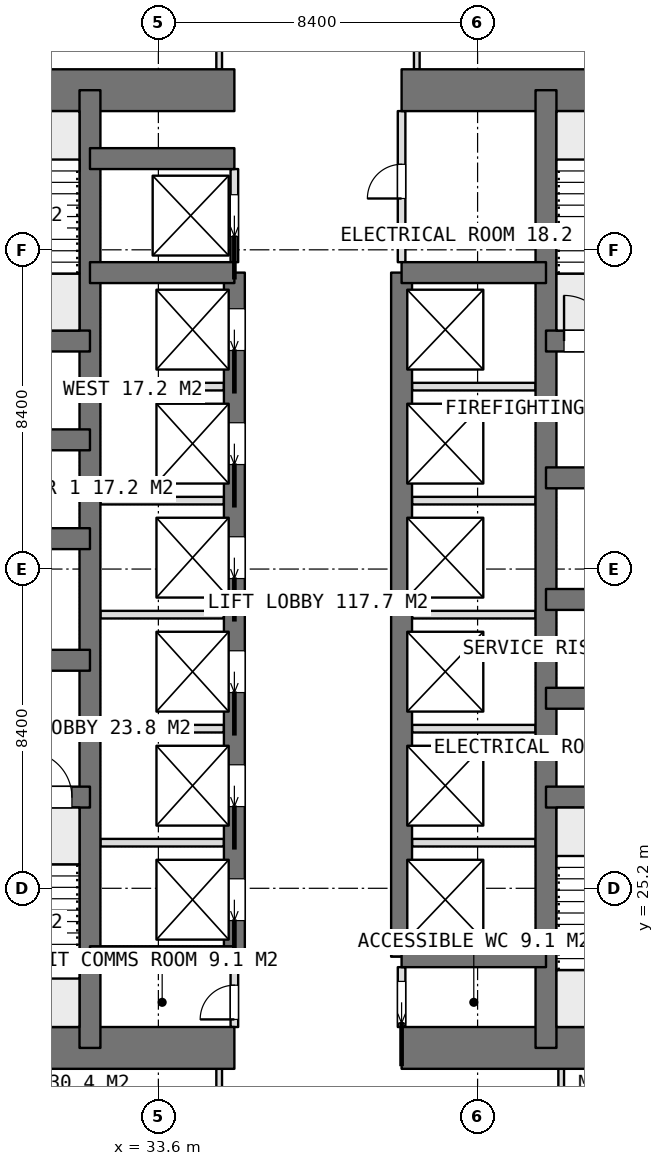
"""IFC4 building model, lengths in metres.
Left out: names, types, materials, properties, quantities, classifications, styles, units other than length and angle.
Written with IfcOpenShell. Run it as: python <this file> out.ifc"""

import sys

from ifc_helpers import new_model, si_unit, direction, frame, frame_2d, origin, place, context, subcontext, project, spatial, rectangle, extrude, element, fill, save


model = new_model("IFC4")
c1 = context("Model", 3, precision=1e-05, world=origin(), true_north=direction((0.0, 1.0)))
c2 = subcontext(c1, "Body", "Model", "MODEL_VIEW")
j1 = project(units=[si_unit("LENGTHUNIT", "METRE"), si_unit("PLANEANGLEUNIT", "RADIAN")], contexts=[c1])
p1 = place(None, origin())
s1 = spatial("IfcSite", under=j1, at=p1, CompositionType="ELEMENT")
p2 = place(p1, origin())
s2 = spatial("IfcBuilding", under=s1, at=p2, CompositionType="ELEMENT")
p3 = place(p2, frame((0.0, 0.0, 66.65)))
s3 = spatial("IfcBuildingStorey", under=s2, at=p3, CompositionType="ELEMENT", Elevation=66.65)
p4 = place(p3, frame((25.2, 21.0, 0.0), z_axis=(0.0, 0.0, 1.0), x_axis=(1.0, 0.0, 0.0)))
e1 = element("IfcWall", 1, at=p4, inside=s3, PredefinedType="SHEAR", context=c2, shape_type="SweptSolid", body=[
    extrude(rectangle(XDim=10.4, YDim=1.1, at=frame_2d((5.2, 0.0))), origin(), (0.0, 0.0, 1.0), 3.75),
])
p5 = place(p3, frame((40.0, 21.0, 0.0), z_axis=(0.0, 0.0, 1.0), x_axis=(1.0, 0.0, 0.0)))
e2 = element("IfcWall", 2, at=p5, inside=s3, PredefinedType="SHEAR", context=c2, shape_type="SweptSolid", body=[
    extrude(rectangle(XDim=10.4, YDim=1.1, at=frame_2d((5.2, 0.0))), origin(), (0.0, 0.0, 1.0), 3.75),
])
p6 = place(p3, frame((25.2, 46.2, 0.0), z_axis=(0.0, 0.0, 1.0), x_axis=(1.0, 0.0, 0.0)))
e3 = element("IfcWall", 3, at=p6, inside=s3, PredefinedType="SHEAR", context=c2, shape_type="SweptSolid", body=[
    extrude(rectangle(XDim=10.4, YDim=1.1, at=frame_2d((5.2, 0.0))), origin(), (0.0, 0.0, 1.0), 3.75),
])
p7 = place(p3, frame((40.0, 46.2, 0.0), z_axis=(0.0, 0.0, 1.0), x_axis=(1.0, 0.0, 0.0)))
e4 = element("IfcWall", 4, at=p7, inside=s3, PredefinedType="SHEAR", context=c2, shape_type="SweptSolid", body=[
    extrude(rectangle(XDim=10.4, YDim=1.1, at=frame_2d((5.2, 0.0))), origin(), (0.0, 0.0, 1.0), 3.75),
])
for number, where, z_axis, x_axis in (
    (5, (31.8, 21.0, 0.0), (0.0, 0.0, 1.0), (0.0, 1.0, 0.0)),
    (6, (43.8, 21.0, 0.0), (0.0, 0.0, 1.0), (0.0, 1.0, 0.0)),
):
    element("IfcWall", number, at=place(p3, frame(where, z_axis=z_axis, x_axis=x_axis)), inside=s3, PredefinedType="SHEAR", context=c2, shape_type="SweptSolid", body=[
        extrude(rectangle(XDim=25.2, YDim=0.55, at=frame_2d((12.6, 0.0))), origin(), (0.0, 0.0, 1.0), 3.75),
    ])
p8 = place(p3, frame((35.6, 23.4, 0.0), z_axis=(0.0, 0.0, 1.0), x_axis=(0.0, 1.0, 0.0)))
e7 = element("IfcWall", 7, at=p8, inside=s3, PredefinedType="SHEAR", context=c2, shape_type="SweptSolid", body=[
    extrude(rectangle(XDim=18.0, YDim=0.55, at=frame_2d((9.0, 0.0))), origin(), (0.0, 0.0, 1.0), 3.75),
])
p9 = place(p8, frame((0.95, 0.0, 0.0)))
e8 = element("IfcOpeningElement", 8, at=p9, cuts=e7, PredefinedType="OPENING", context=c2, shape_type="SweptSolid", body=[
    extrude(rectangle(XDim=1.1, YDim=2.1, at=frame_2d((0.55, 1.05))), frame((0.0, 0.285, 0.0), z_axis=(0.0, -1.0, 0.0), x_axis=(1.0, 0.0, 0.0)), (0.0, 0.0, 1.0), 0.57),
])
p10 = place(p8, frame((3.95, 0.0, 0.0)))
e9 = element("IfcOpeningElement", 9, at=p10, cuts=e7, PredefinedType="OPENING", context=c2, shape_type="SweptSolid", body=[
    extrude(rectangle(XDim=1.1, YDim=2.1, at=frame_2d((0.55, 1.05))), frame((0.0, 0.285, 0.0), z_axis=(0.0, -1.0, 0.0), x_axis=(1.0, 0.0, 0.0)), (0.0, 0.0, 1.0), 0.57),
])
p11 = place(p8, frame((6.95, 0.0, 0.0)))
e10 = element("IfcOpeningElement", 10, at=p11, cuts=e7, PredefinedType="OPENING", context=c2, shape_type="SweptSolid", body=[
    extrude(rectangle(XDim=1.1, YDim=2.1, at=frame_2d((0.55, 1.05))), frame((0.0, 0.285, 0.0), z_axis=(0.0, -1.0, 0.0), x_axis=(1.0, 0.0, 0.0)), (0.0, 0.0, 1.0), 0.57),
])
p12 = place(p8, frame((9.95, 0.0, 0.0)))
e11 = element("IfcOpeningElement", 11, at=p12, cuts=e7, PredefinedType="OPENING", context=c2, shape_type="SweptSolid", body=[
    extrude(rectangle(XDim=1.1, YDim=2.1, at=frame_2d((0.55, 1.05))), frame((0.0, 0.285, 0.0), z_axis=(0.0, -1.0, 0.0), x_axis=(1.0, 0.0, 0.0)), (0.0, 0.0, 1.0), 0.57),
])
p13 = place(p8, frame((12.95, 0.0, 0.0)))
e12 = element("IfcOpeningElement", 12, at=p13, cuts=e7, PredefinedType="OPENING", context=c2, shape_type="SweptSolid", body=[
    extrude(rectangle(XDim=1.1, YDim=2.1, at=frame_2d((0.55, 1.05))), frame((0.0, 0.285, 0.0), z_axis=(0.0, -1.0, 0.0), x_axis=(1.0, 0.0, 0.0)), (0.0, 0.0, 1.0), 0.57),
])
p14 = place(p8, frame((15.95, 0.0, 0.0)))
e13 = element("IfcOpeningElement", 13, at=p14, cuts=e7, PredefinedType="OPENING", context=c2, shape_type="SweptSolid", body=[
    extrude(rectangle(XDim=1.1, YDim=2.1, at=frame_2d((0.55, 1.05))), frame((0.0, 0.285, 0.0), z_axis=(0.0, -1.0, 0.0), x_axis=(1.0, 0.0, 0.0)), (0.0, 0.0, 1.0), 0.57),
])
p15 = place(p3, frame((40.0, 23.4, 0.0), z_axis=(0.0, 0.0, 1.0), x_axis=(0.0, 1.0, 0.0)))
e14 = element("IfcWall", 14, at=p15, inside=s3, PredefinedType="SHEAR", context=c2, shape_type="SweptSolid", body=[
    extrude(rectangle(XDim=18.0, YDim=0.55, at=frame_2d((9.0, 0.0))), origin(), (0.0, 0.0, 1.0), 3.75),
])
for number, where, z_axis, x_axis in (
    (15, (31.8, 23.4, 0.0), (0.0, 0.0, 1.0), (1.0, 0.0, 0.0)),
    (16, (31.8, 41.4, 0.0), (0.0, 0.0, 1.0), (1.0, 0.0, 0.0)),
    (17, (31.8, 44.4, 0.0), (0.0, 0.0, 1.0), (1.0, 0.0, 0.0)),
    (18, (40.0, 23.4, 0.0), (0.0, 0.0, 1.0), (1.0, 0.0, 0.0)),
    (19, (40.0, 41.4, 0.0), (0.0, 0.0, 1.0), (1.0, 0.0, 0.0)),
):
    element("IfcWall", number, at=place(p3, frame(where, z_axis=z_axis, x_axis=x_axis)), inside=s3, PredefinedType="SHEAR", context=c2, shape_type="SweptSolid", body=[
        extrude(rectangle(XDim=3.8, YDim=0.55, at=frame_2d((1.9, 0.0))), origin(), (0.0, 0.0, 1.0), 3.75),
    ])
p16 = place(p3, frame((25.2, 27.6, 0.0), z_axis=(0.0, 0.0, 1.0), x_axis=(1.0, 0.0, 0.0)))
e20 = element("IfcWall", 20, at=p16, inside=s3, PredefinedType="SHEAR", context=c2, shape_type="SweptSolid", body=[
    extrude(rectangle(XDim=6.6, YDim=0.55, at=frame_2d((3.3, 0.0))), origin(), (0.0, 0.0, 1.0), 3.75),
])
p17 = place(p16, frame((4.925, 0.0, 0.0)))
e21 = element("IfcOpeningElement", 21, at=p17, cuts=e20, PredefinedType="OPENING", context=c2, shape_type="SweptSolid", body=[
    extrude(rectangle(XDim=1.2, YDim=2.1, at=frame_2d((0.6, 1.05))), frame((0.0, 0.285, 0.0), z_axis=(0.0, -1.0, 0.0), x_axis=(1.0, 0.0, 0.0)), (0.0, 0.0, 1.0), 0.57),
])
p18 = place(p3, frame((25.2, 31.2, 0.0), z_axis=(0.0, 0.0, 1.0), x_axis=(1.0, 0.0, 0.0)))
e22 = element("IfcWall", 22, at=p18, inside=s3, PredefinedType="SHEAR", context=c2, shape_type="SweptSolid", body=[
    extrude(rectangle(XDim=6.6, YDim=0.55, at=frame_2d((3.3, 0.0))), origin(), (0.0, 0.0, 1.0), 3.75),
])
p19 = place(p18, frame((2.65, 0.0, 0.0)))
e23 = element("IfcOpeningElement", 23, at=p19, cuts=e22, PredefinedType="OPENING", context=c2, shape_type="SweptSolid", body=[
    extrude(rectangle(XDim=1.3, YDim=2.1, at=frame_2d((0.65, 1.05))), frame((0.0, 0.285, 0.0), z_axis=(0.0, -1.0, 0.0), x_axis=(1.0, 0.0, 0.0)), (0.0, 0.0, 1.0), 0.57),
])
for number, where, z_axis, x_axis in (
    (24, (25.2, 34.4, 0.0), (0.0, 0.0, 1.0), (1.0, 0.0, 0.0)),
    (25, (25.2, 37.0, 0.0), (0.0, 0.0, 1.0), (1.0, 0.0, 0.0)),
    (26, (25.2, 39.6, 0.0), (0.0, 0.0, 1.0), (1.0, 0.0, 0.0)),
):
    element("IfcWall", number, at=place(p3, frame(where, z_axis=z_axis, x_axis=x_axis)), inside=s3, PredefinedType="SHEAR", context=c2, shape_type="SweptSolid", body=[
        extrude(rectangle(XDim=6.6, YDim=0.55, at=frame_2d((3.3, 0.0))), origin(), (0.0, 0.0, 1.0), 3.75),
    ])
for number, where, z_axis, x_axis in (
    (27, (43.8, 27.6, 0.0), (0.0, 0.0, 1.0), (1.0, 0.0, 0.0)),
    (28, (43.8, 30.2, 0.0), (0.0, 0.0, 1.0), (1.0, 0.0, 0.0)),
    (29, (43.8, 32.8, 0.0), (0.0, 0.0, 1.0), (1.0, 0.0, 0.0)),
):
    element("IfcWall", number, at=place(p3, frame(where, z_axis=z_axis, x_axis=x_axis)), inside=s3, PredefinedType="SHEAR", context=c2, shape_type="SweptSolid", body=[
        extrude(rectangle(XDim=6.6, YDim=0.55, at=frame_2d((3.3, 0.0))), origin(), (0.0, 0.0, 1.0), 3.75),
    ])
p20 = place(p3, frame((43.8, 36.0, 0.0), z_axis=(0.0, 0.0, 1.0), x_axis=(1.0, 0.0, 0.0)))
e30 = element("IfcWall", 30, at=p20, inside=s3, PredefinedType="SHEAR", context=c2, shape_type="SweptSolid", body=[
    extrude(rectangle(XDim=6.6, YDim=0.55, at=frame_2d((3.3, 0.0))), origin(), (0.0, 0.0, 1.0), 3.75),
])
p21 = place(p20, frame((2.65, 0.0, 0.0)))
e31 = element("IfcOpeningElement", 31, at=p21, cuts=e30, PredefinedType="OPENING", context=c2, shape_type="SweptSolid", body=[
    extrude(rectangle(XDim=1.3, YDim=2.1, at=frame_2d((0.65, 1.05))), frame((0.0, 0.285, 0.0), z_axis=(0.0, -1.0, 0.0), x_axis=(1.0, 0.0, 0.0)), (0.0, 0.0, 1.0), 0.57),
])
p22 = place(p3, frame((43.8, 39.6, 0.0), z_axis=(0.0, 0.0, 1.0), x_axis=(1.0, 0.0, 0.0)))
e32 = element("IfcWall", 32, at=p22, inside=s3, PredefinedType="SHEAR", context=c2, shape_type="SweptSolid", body=[
    extrude(rectangle(XDim=6.6, YDim=0.55, at=frame_2d((3.3, 0.0))), origin(), (0.0, 0.0, 1.0), 3.75),
])
p23 = place(p22, frame((0.475, 0.0, 0.0)))
e33 = element("IfcOpeningElement", 33, at=p23, cuts=e32, PredefinedType="OPENING", context=c2, shape_type="SweptSolid", body=[
    extrude(rectangle(XDim=1.2, YDim=2.1, at=frame_2d((0.6, 1.05))), frame((0.0, 0.285, 0.0), z_axis=(0.0, -1.0, 0.0), x_axis=(1.0, 0.0, 0.0)), (0.0, 0.0, 1.0), 0.57),
])
for number, where, z_axis, x_axis in (
    (34, (32.075, 26.4, 0.0), (0.0, 0.0, 1.0), (1.0, 0.0, 0.0)),
    (35, (32.075, 29.4, 0.0), (0.0, 0.0, 1.0), (1.0, 0.0, 0.0)),
    (36, (32.075, 32.4, 0.0), (0.0, 0.0, 1.0), (1.0, 0.0, 0.0)),
    (37, (32.075, 35.4, 0.0), (0.0, 0.0, 1.0), (1.0, 0.0, 0.0)),
    (38, (32.075, 38.4, 0.0), (0.0, 0.0, 1.0), (1.0, 0.0, 0.0)),
    (39, (40.275, 26.4, 0.0), (0.0, 0.0, 1.0), (1.0, 0.0, 0.0)),
    (40, (40.275, 29.4, 0.0), (0.0, 0.0, 1.0), (1.0, 0.0, 0.0)),
    (41, (40.275, 32.4, 0.0), (0.0, 0.0, 1.0), (1.0, 0.0, 0.0)),
    (42, (40.275, 35.4, 0.0), (0.0, 0.0, 1.0), (1.0, 0.0, 0.0)),
    (43, (40.275, 38.4, 0.0), (0.0, 0.0, 1.0), (1.0, 0.0, 0.0)),
):
    element("IfcWall", number, at=place(p3, frame(where, z_axis=z_axis, x_axis=x_axis)), inside=s3, PredefinedType="PARTITIONING", context=c2, shape_type="SweptSolid", body=[
        extrude(rectangle(XDim=3.25, YDim=0.2, at=frame_2d((1.625, 0.0))), origin(), (0.0, 0.0, 1.0), 3.5),
    ])
p24 = place(p3, frame((40.0, 21.55, 0.0), z_axis=(0.0, 0.0, 1.0), x_axis=(0.0, 1.0, 0.0)))
e44 = element("IfcWall", 44, at=p24, inside=s3, PredefinedType="PARTITIONING", context=c2, shape_type="SweptSolid", body=[
    extrude(rectangle(XDim=1.575, YDim=0.2, at=frame_2d((0.788, 0.0))), origin(), (0.0, 0.0, 1.0), 3.5),
])
p25 = place(p24, frame((0.1, 0.0, 0.0)))
e45 = element("IfcOpeningElement", 45, at=p25, cuts=e44, PredefinedType="OPENING", context=c2, shape_type="SweptSolid", body=[
    extrude(rectangle(XDim=1.1, YDim=2.1, at=frame_2d((0.55, 1.05))), frame((0.0, 0.11, 0.0), z_axis=(0.0, -1.0, 0.0), x_axis=(1.0, 0.0, 0.0)), (0.0, 0.0, 1.0), 0.22),
])
p26 = place(p3, frame((40.0, 41.675, 0.0), z_axis=(0.0, 0.0, 1.0), x_axis=(0.0, 1.0, 0.0)))
e46 = element("IfcWall", 46, at=p26, inside=s3, PredefinedType="PARTITIONING", context=c2, shape_type="SweptSolid", body=[
    extrude(rectangle(XDim=3.975, YDim=0.2, at=frame_2d((1.987, 0.0))), origin(), (0.0, 0.0, 1.0), 3.5),
])
p27 = place(p26, frame((1.675, 0.0, 0.0)))
e47 = element("IfcOpeningElement", 47, at=p27, cuts=e46, PredefinedType="OPENING", context=c2, shape_type="SweptSolid", body=[
    extrude(rectangle(XDim=0.9, YDim=2.1, at=frame_2d((0.45, 1.05))), frame((0.0, 0.11, 0.0), z_axis=(0.0, -1.0, 0.0), x_axis=(1.0, 0.0, 0.0)), (0.0, 0.0, 1.0), 0.22),
])
p28 = place(p3, frame((35.6, 41.675, 0.0), z_axis=(0.0, 0.0, 1.0), x_axis=(0.0, 1.0, 0.0)))
e48 = element("IfcWall", 48, at=p28, inside=s3, PredefinedType="PARTITIONING", context=c2, shape_type="SweptSolid", body=[
    extrude(rectangle(XDim=2.45, YDim=0.2, at=frame_2d((1.225, 0.0))), origin(), (0.0, 0.0, 1.0), 3.5),
])
p29 = place(p28, frame((0.675, 0.0, 0.0)))
e49 = element("IfcOpeningElement", 49, at=p29, cuts=e48, PredefinedType="OPENING", context=c2, shape_type="SweptSolid", body=[
    extrude(rectangle(XDim=1.1, YDim=2.1, at=frame_2d((0.55, 1.05))), frame((0.0, 0.11, 0.0), z_axis=(0.0, -1.0, 0.0), x_axis=(1.0, 0.0, 0.0)), (0.0, 0.0, 1.0), 0.22),
])
p30 = place(p3, frame((35.6, 21.55, 0.0), z_axis=(0.0, 0.0, 1.0), x_axis=(0.0, 1.0, 0.0)))
e50 = element("IfcWall", 50, at=p30, inside=s3, PredefinedType="PARTITIONING", context=c2, shape_type="SweptSolid", body=[
    extrude(rectangle(XDim=1.575, YDim=0.2, at=frame_2d((0.788, 0.0))), origin(), (0.0, 0.0, 1.0), 3.5),
])
p31 = place(p30, frame((0.2, 0.0, 0.0)))
e51 = element("IfcOpeningElement", 51, at=p31, cuts=e50, PredefinedType="OPENING", context=c2, shape_type="SweptSolid", body=[
    extrude(rectangle(XDim=0.9, YDim=2.1, at=frame_2d((0.45, 1.05))), frame((0.0, 0.11, 0.0), z_axis=(0.0, -1.0, 0.0), x_axis=(1.0, 0.0, 0.0)), (0.0, 0.0, 1.0), 0.22),
])
for number, where, z_axis, x_axis in (
    (52, (40.4, 46.75, 0.0), (0.0, 0.0, 1.0), (0.0, 1.0, 0.0)),
    (53, (35.2, 46.75, 0.0), (0.0, 0.0, 1.0), (0.0, 1.0, 0.0)),
    (54, (35.2, 17.875, 0.0), (0.0, 0.0, 1.0), (0.0, 1.0, 0.0)),
    (55, (44.2, 17.875, 0.0), (0.0, 0.0, 1.0), (0.0, 1.0, 0.0)),
):
    element("IfcWall", number, at=place(p3, frame(where, z_axis=z_axis, x_axis=x_axis)), inside=s3, PredefinedType="PARTITIONING", context=c2, shape_type="SweptSolid", body=[
        extrude(rectangle(XDim=2.575, YDim=0.15, at=frame_2d((1.288, 0.0))), origin(), (0.0, 0.0, 1.0), 3.5),
    ])
p32 = place(p25, origin())
e56 = element("IfcDoor", 56, at=p32, inside=s3, OperationType="SLIDING_TO_LEFT", PredefinedType="DOOR", context=c2, shape_type="SweptSolid", body=[
    extrude(rectangle(XDim=1.1, YDim=2.1, at=frame_2d((0.55, 1.05))), frame((0.0, 0.025, 0.0), z_axis=(0.0, -1.0, 0.0), x_axis=(1.0, 0.0, 0.0)), (0.0, 0.0, 1.0), 0.05),
])
fill(e45, e56)
p33 = place(p31, origin())
e57 = element("IfcDoor", 57, at=p33, inside=s3, OperationType="SINGLE_SWING_LEFT", PredefinedType="DOOR", context=c2, shape_type="SweptSolid", body=[
    extrude(rectangle(XDim=0.9, YDim=2.1, at=frame_2d((0.45, 1.05))), frame((0.0, 0.025, 0.0), z_axis=(0.0, -1.0, 0.0), x_axis=(1.0, 0.0, 0.0)), (0.0, 0.0, 1.0), 0.05),
])
fill(e51, e57)
p34 = place(p27, origin())
e58 = element("IfcDoor", 58, at=p34, inside=s3, OperationType="SINGLE_SWING_LEFT", PredefinedType="DOOR", context=c2, shape_type="SweptSolid", body=[
    extrude(rectangle(XDim=0.9, YDim=2.1, at=frame_2d((0.45, 1.05))), frame((0.0, 0.025, 0.0), z_axis=(0.0, -1.0, 0.0), x_axis=(1.0, 0.0, 0.0)), (0.0, 0.0, 1.0), 0.05),
])
fill(e47, e58)
p35 = place(p9, origin())
e59 = element("IfcDoor", 59, at=p35, inside=s3, OperationType="SLIDING_TO_LEFT", PredefinedType="USERDEFINED", context=c2, shape_type="SweptSolid", body=[
    extrude(rectangle(XDim=1.1, YDim=2.1, at=frame_2d((0.55, 1.05))), frame((0.0, 0.025, 0.0), z_axis=(0.0, -1.0, 0.0), x_axis=(1.0, 0.0, 0.0)), (0.0, 0.0, 1.0), 0.05),
])
fill(e8, e59)
p36 = place(p10, origin())
e60 = element("IfcDoor", 60, at=p36, inside=s3, OperationType="SLIDING_TO_LEFT", PredefinedType="USERDEFINED", context=c2, shape_type="SweptSolid", body=[
    extrude(rectangle(XDim=1.1, YDim=2.1, at=frame_2d((0.55, 1.05))), frame((0.0, 0.025, 0.0), z_axis=(0.0, -1.0, 0.0), x_axis=(1.0, 0.0, 0.0)), (0.0, 0.0, 1.0), 0.05),
])
fill(e9, e60)
p37 = place(p11, origin())
e61 = element("IfcDoor", 61, at=p37, inside=s3, OperationType="SLIDING_TO_LEFT", PredefinedType="USERDEFINED", context=c2, shape_type="SweptSolid", body=[
    extrude(rectangle(XDim=1.1, YDim=2.1, at=frame_2d((0.55, 1.05))), frame((0.0, 0.025, 0.0), z_axis=(0.0, -1.0, 0.0), x_axis=(1.0, 0.0, 0.0)), (0.0, 0.0, 1.0), 0.05),
])
fill(e10, e61)
p38 = place(p12, origin())
e62 = element("IfcDoor", 62, at=p38, inside=s3, OperationType="SLIDING_TO_LEFT", PredefinedType="USERDEFINED", context=c2, shape_type="SweptSolid", body=[
    extrude(rectangle(XDim=1.1, YDim=2.1, at=frame_2d((0.55, 1.05))), frame((0.0, 0.025, 0.0), z_axis=(0.0, -1.0, 0.0), x_axis=(1.0, 0.0, 0.0)), (0.0, 0.0, 1.0), 0.05),
])
fill(e11, e62)
p39 = place(p13, origin())
e63 = element("IfcDoor", 63, at=p39, inside=s3, OperationType="SLIDING_TO_LEFT", PredefinedType="USERDEFINED", context=c2, shape_type="SweptSolid", body=[
    extrude(rectangle(XDim=1.1, YDim=2.1, at=frame_2d((0.55, 1.05))), frame((0.0, 0.025, 0.0), z_axis=(0.0, -1.0, 0.0), x_axis=(1.0, 0.0, 0.0)), (0.0, 0.0, 1.0), 0.05),
])
fill(e12, e63)
p40 = place(p14, origin())
e64 = element("IfcDoor", 64, at=p40, inside=s3, OperationType="SLIDING_TO_LEFT", PredefinedType="USERDEFINED", context=c2, shape_type="SweptSolid", body=[
    extrude(rectangle(XDim=1.1, YDim=2.1, at=frame_2d((0.55, 1.05))), frame((0.0, 0.025, 0.0), z_axis=(0.0, -1.0, 0.0), x_axis=(1.0, 0.0, 0.0)), (0.0, 0.0, 1.0), 0.05),
])
fill(e13, e64)
p41 = place(p29, origin())
e65 = element("IfcDoor", 65, at=p41, inside=s3, OperationType="SLIDING_TO_LEFT", PredefinedType="USERDEFINED", context=c2, shape_type="SweptSolid", body=[
    extrude(rectangle(XDim=1.1, YDim=2.1, at=frame_2d((0.55, 1.05))), frame((0.0, 0.025, 0.0), z_axis=(0.0, -1.0, 0.0), x_axis=(1.0, 0.0, 0.0)), (0.0, 0.0, 1.0), 0.05),
])
fill(e49, e65)
p42 = place(p17, origin())
e66 = element("IfcDoor", 66, at=p42, inside=s3, OperationType="SINGLE_SWING_RIGHT", PredefinedType="DOOR", context=c2, shape_type="SweptSolid", body=[
    extrude(rectangle(XDim=1.2, YDim=2.1, at=frame_2d((0.6, 1.05))), frame((0.0, 0.025, 0.0), z_axis=(0.0, -1.0, 0.0), x_axis=(1.0, 0.0, 0.0)), (0.0, 0.0, 1.0), 0.05),
])
fill(e21, e66)
p43 = place(p23, origin())
e67 = element("IfcDoor", 67, at=p43, inside=s3, OperationType="SINGLE_SWING_RIGHT", PredefinedType="DOOR", context=c2, shape_type="SweptSolid", body=[
    extrude(rectangle(XDim=1.2, YDim=2.1, at=frame_2d((0.6, 1.05))), frame((0.0, 0.025, 0.0), z_axis=(0.0, -1.0, 0.0), x_axis=(1.0, 0.0, 0.0)), (0.0, 0.0, 1.0), 0.05),
])
fill(e33, e67)
save(model, sys.argv[1])
